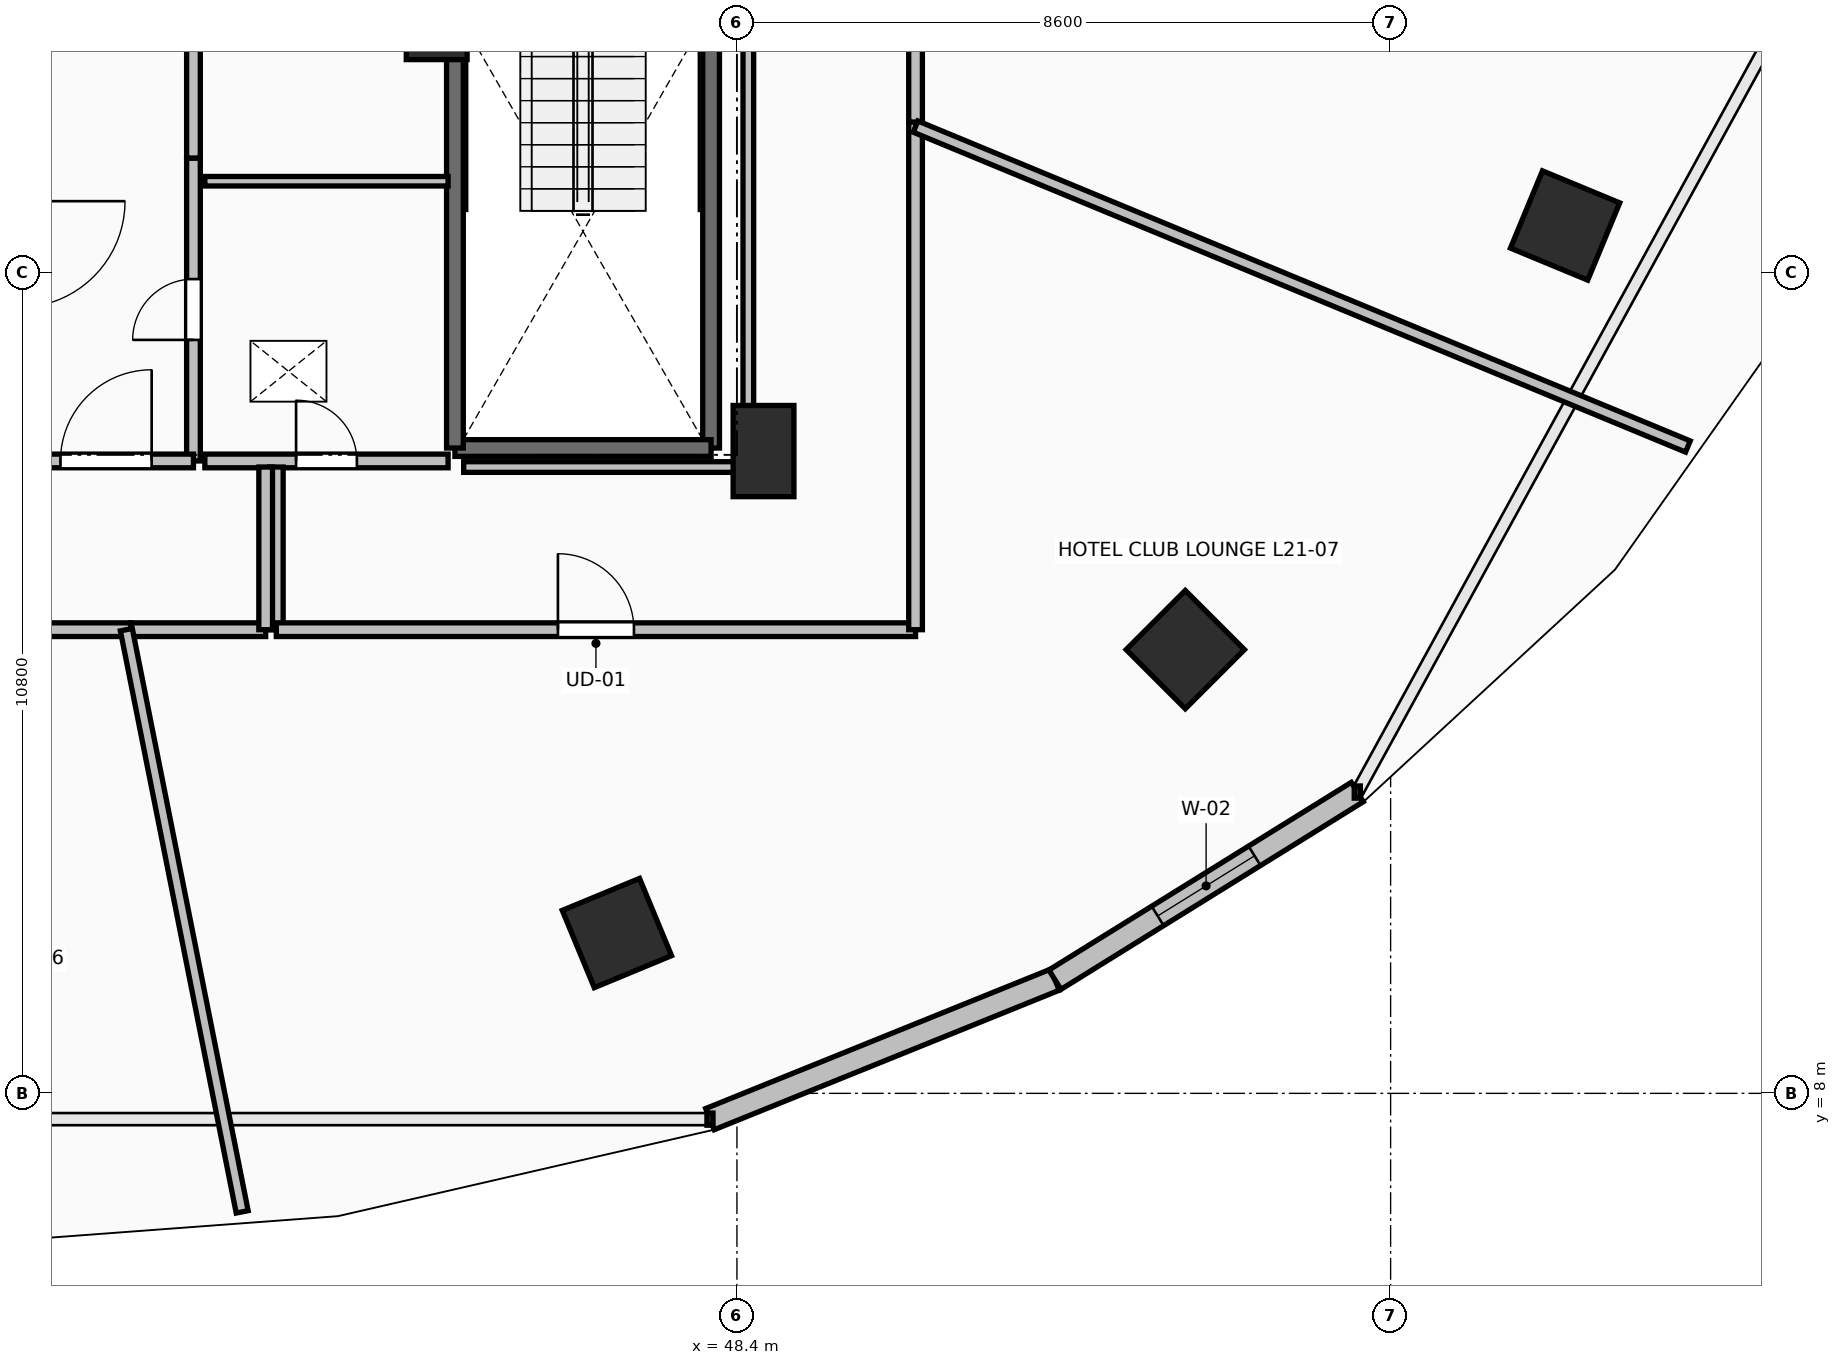
"""IFC4 building model, lengths in metres.
Left out: names, types, materials, properties, quantities, classifications, styles, units other than length and angle.
Written with IfcOpenShell. Run it as: python <this file> out.ifc"""

import sys

from ifc_helpers import new_model, si_unit, direction, frame, frame_2d, origin, origin_2d, place, context, subcontext, project, spatial, rectangle, extrude, element, fill, save


model = new_model("IFC4")
c1 = context("Model", 3, precision=1e-05, world=origin(), true_north=direction((0.0, 1.0)))
c2 = subcontext(c1, "Body", "Model", "MODEL_VIEW")
j1 = project(units=[si_unit("LENGTHUNIT", "METRE"), si_unit("PLANEANGLEUNIT", "RADIAN")], contexts=[c1])
p1 = place(None, origin())
s1 = spatial("IfcSite", under=j1, at=p1, CompositionType="ELEMENT")
p2 = place(p1, origin())
s2 = spatial("IfcBuilding", under=s1, at=p2, CompositionType="ELEMENT")
p3 = place(p2, frame((0.0, 0.0, 82.3)))
s3 = spatial("IfcBuildingStorey", under=s2, at=p3, CompositionType="ELEMENT", Elevation=82.3)
for number, where, z_axis, x_axis in (
    (1, (46.821, 10.109, 0.0), (0.0, 0.0, 1.0), (0.383, -0.924, 0.0)),
    (2, (54.299, 13.838, 0.0), (0.0, 0.0, 1.0), (0.707, -0.707, 0.0)),
    (3, (59.295, 19.418, 0.0), (0.0, 0.0, 1.0), (0.924, -0.383, 0.0)),
):
    element("IfcColumn", number, at=place(p3, frame(where, z_axis=z_axis, x_axis=x_axis)), inside=s3, PredefinedType="COLUMN", context=c2, shape_type="SweptSolid", body=[
        extrude(rectangle(XDim=1.1, YDim=1.1, at=origin_2d()), origin(), (0.0, 0.0, 1.0), 3.5),
    ])
for number, where, z_axis, x_axis in (
    (4, (48.75, 16.45, 0.0), (0.0, 0.0, 1.0), (1.0, 0.0, 0.0)),
    (5, (44.45, 22.2, 0.0), (0.0, 0.0, 1.0), (1.0, 0.0, 0.0)),
):
    element("IfcColumn", number, at=place(p3, frame(where, z_axis=z_axis, x_axis=x_axis)), inside=s3, PredefinedType="PILASTER", context=c2, shape_type="SweptSolid", body=[
        extrude(rectangle(XDim=0.8, YDim=1.2, at=origin_2d()), origin(), (0.0, 0.0, 1.0), 3.5),
    ])
p4 = place(p3, frame((48.045, 7.661, 0.0), z_axis=(0.0, 0.0, 1.0), x_axis=(0.927122233109, 0.374759075775, 0.0)))
e6 = element("IfcWall", 6, at=p4, inside=s3, PredefinedType="STANDARD", context=c2, shape_type="SweptSolid", body=[
    extrude(rectangle(XDim=4.895, YDim=0.3, at=frame_2d((2.448, 0.0))), origin(), (0.0, 0.0, 1.0), 3.24),
])
p5 = place(p3, frame((52.584, 9.495, 0.0), z_axis=(0.0, 0.0, 1.0), x_axis=(0.849684479743, 0.527291461038, 0.0)))
e7 = element("IfcWall", 7, at=p5, inside=s3, PredefinedType="STANDARD", context=c2, shape_type="SweptSolid", body=[
    extrude(rectangle(XDim=4.681, YDim=0.3, at=frame_2d((2.341, 0.0))), origin(), (0.0, 0.0, 1.0), 3.24),
])
p6 = place(p5, frame((1.591, 0.0, 0.85)))
e8 = element("IfcOpeningElement", 8, at=p6, cuts=e7, PredefinedType="OPENING", context=c2, shape_type="SweptSolid", body=[
    extrude(rectangle(XDim=1.5, YDim=2.19, at=frame_2d((0.75, 1.095))), frame((0.0, 0.165, 0.0), z_axis=(0.0, -1.0, 0.0), x_axis=(1.0, 0.0, 0.0)), (0.0, 0.0, 1.0), 0.33),
])
p7 = place(p3, frame((48.06, 23.91, 0.0), z_axis=(0.0, 0.0, 1.0), x_axis=(0.0, -1.0, 0.0)))
e9 = element("IfcWall", 9, at=p7, inside=s3, PredefinedType="SOLIDWALL", context=c2, shape_type="SweptSolid", body=[
    extrude(rectangle(XDim=7.42, YDim=0.22, at=frame_2d((3.71, 0.0))), origin(), (0.0, 0.0, 1.0), 3.24),
])
p8 = place(p3, frame((48.06, 16.49, 0.0), z_axis=(0.0, 0.0, 1.0), x_axis=(-1.0, 0.0, 0.0)))
e10 = element("IfcWall", 10, at=p8, inside=s3, PredefinedType="SOLIDWALL", context=c2, shape_type="SweptSolid", body=[
    extrude(rectangle(XDim=3.37, YDim=0.22, at=frame_2d((1.685, 0.0))), origin(), (0.0, 0.0, 1.0), 3.24),
])
p9 = place(p3, frame((44.69, 16.49, 0.0), z_axis=(0.0, 0.0, 1.0), x_axis=(0.0, 1.0, 0.0)))
e11 = element("IfcWall", 11, at=p9, inside=s3, PredefinedType="SOLIDWALL", context=c2, shape_type="SweptSolid", body=[
    extrude(rectangle(XDim=7.42, YDim=0.22, at=frame_2d((3.71, 0.0))), origin(), (0.0, 0.0, 1.0), 3.24),
])
p10 = place(p3, frame((41.25, 16.32, 0.0), z_axis=(0.0, 0.0, 1.0), x_axis=(0.0, 1.0, 0.0)))
e12 = element("IfcWall", 12, at=p10, inside=s3, PredefinedType="PARTITIONING", context=c2, shape_type="SweptSolid", body=[
    extrude(rectangle(XDim=3.985, YDim=0.18, at=frame_2d((1.992, 0.0))), origin(), (0.0, 0.0, 1.0), 3.24),
])
p11 = place(p10, frame((1.593, 0.0, 0.0)))
e13 = element("IfcOpeningElement", 13, at=p11, cuts=e12, PredefinedType="OPENING", context=c2, shape_type="SweptSolid", body=[
    extrude(rectangle(XDim=0.8, YDim=2.05, at=frame_2d((0.4, 1.025))), frame((0.0, 0.105, 0.0), z_axis=(0.0, -1.0, 0.0), x_axis=(1.0, 0.0, 0.0)), (0.0, 0.0, 1.0), 0.21),
])
p12 = place(p3, frame((41.25, 20.305, 0.0), z_axis=(0.0, 0.0, 1.0), x_axis=(0.0, 1.0, 0.0)))
e14 = element("IfcWall", 14, at=p12, inside=s3, PredefinedType="PARTITIONING", context=c2, shape_type="SweptSolid", body=[
    extrude(rectangle(XDim=3.895, YDim=0.18, at=frame_2d((1.948, 0.0))), origin(), (0.0, 0.0, 1.0), 3.24),
])
p13 = place(p12, frame((1.522, 0.0, 0.0)))
e15 = element("IfcOpeningElement", 15, at=p13, cuts=e14, PredefinedType="OPENING", context=c2, shape_type="SweptSolid", body=[
    extrude(rectangle(XDim=0.85, YDim=2.1, at=frame_2d((0.425, 1.05))), frame((0.0, 0.105, 0.0), z_axis=(0.0, -1.0, 0.0), x_axis=(1.0, 0.0, 0.0)), (0.0, 0.0, 1.0), 0.21),
])
p14 = place(p3, frame((38.95, 16.32, 0.0), z_axis=(0.0, 0.0, 1.0), x_axis=(1.0, 0.0, 0.0)))
e16 = element("IfcWall", 16, at=p14, inside=s3, PredefinedType="PARTITIONING", context=c2, shape_type="SweptSolid", body=[
    extrude(rectangle(XDim=2.3, YDim=0.18, at=frame_2d((1.15, 0.0))), origin(), (0.0, 0.0, 1.0), 3.24),
])
p15 = place(p14, frame((0.55, 0.0, 0.0)))
e17 = element("IfcOpeningElement", 17, at=p15, cuts=e16, PredefinedType="OPENING", context=c2, shape_type="SweptSolid", body=[
    extrude(rectangle(XDim=1.2, YDim=2.15, at=frame_2d((0.6, 1.075))), frame((0.0, 0.105, 0.0), z_axis=(0.0, -1.0, 0.0), x_axis=(1.0, 0.0, 0.0)), (0.0, 0.0, 1.0), 0.21),
])
p16 = place(p3, frame((44.6, 20.0, 0.0), z_axis=(0.0, 0.0, 1.0), x_axis=(-1.0, 0.0, 0.0)))
e18 = element("IfcWall", 18, at=p16, inside=s3, PredefinedType="PARTITIONING", context=c2, shape_type="SweptSolid", body=[
    extrude(rectangle(XDim=3.2, YDim=0.125, at=frame_2d((1.6, 0.0))), origin(), (0.0, 0.0, 1.0), 3.24),
])
p17 = place(p3, frame((41.4, 16.32, 0.0), z_axis=(0.0, 0.0, 1.0), x_axis=(1.0, 0.0, 0.0)))
e19 = element("IfcWall", 19, at=p17, inside=s3, PredefinedType="PARTITIONING", context=c2, shape_type="SweptSolid", body=[
    extrude(rectangle(XDim=3.2, YDim=0.18, at=frame_2d((1.6, 0.0))), origin(), (0.0, 0.0, 1.0), 3.24),
])
p18 = place(p17, frame((1.2, 0.0, 0.0)))
e20 = element("IfcOpeningElement", 20, at=p18, cuts=e19, PredefinedType="OPENING", context=c2, shape_type="SweptSolid", body=[
    extrude(rectangle(XDim=0.8, YDim=2.05, at=frame_2d((0.4, 1.025))), frame((0.0, 0.105, 0.0), z_axis=(0.0, -1.0, 0.0), x_axis=(1.0, 0.0, 0.0)), (0.0, 0.0, 1.0), 0.21),
])
p19 = place(p3, frame((36.341, 14.1, 0.0), z_axis=(0.0, 0.0, 1.0), x_axis=(1.0, 0.0, 0.0)))
e21 = element("IfcWall", 21, at=p19, inside=s3, PredefinedType="PARTITIONING", context=c2, shape_type="SweptSolid", body=[
    extrude(rectangle(XDim=4.087, YDim=0.18, at=frame_2d((2.043, 0.0))), origin(), (0.0, 0.0, 1.0), 2.922),
])
p20 = place(p19, frame((1.519, 0.0, 0.0)))
e22 = element("IfcOpeningElement", 22, at=p20, cuts=e21, PredefinedType="OPENING", context=c2, shape_type="SweptSolid", body=[
    extrude(rectangle(XDim=1.05, YDim=2.2, at=frame_2d((0.525, 1.1))), frame((0.0, 0.105, 0.0), z_axis=(0.0, -1.0, 0.0), x_axis=(1.0, 0.0, 0.0)), (0.0, 0.0, 1.0), 0.21),
])
p21 = place(p3, frame((42.34, 16.24, 0.0), z_axis=(0.0, 0.0, 1.0), x_axis=(0.0, -1.0, 0.0)))
e23 = element("IfcWall", 23, at=p21, inside=s3, PredefinedType="PARTITIONING", context=c2, shape_type="SweptSolid", body=[
    extrude(rectangle(XDim=2.14, YDim=0.18, at=frame_2d((1.07, 0.0))), origin(), (0.0, 0.0, 1.0), 2.922),
])
p22 = place(p3, frame((42.34, 14.1, 0.0), z_axis=(0.0, 0.0, 1.0), x_axis=(1.0, 0.0, 0.0)))
e24 = element("IfcWall", 24, at=p22, inside=s3, PredefinedType="PARTITIONING", context=c2, shape_type="SweptSolid", body=[
    extrude(rectangle(XDim=8.41, YDim=0.18, at=frame_2d((4.205, 0.0))), origin(), (0.0, 0.0, 1.0), 2.432),
])
p23 = place(p22, frame((3.705, 0.0, 0.0)))
e25 = element("IfcOpeningElement", 25, at=p23, cuts=e24, PredefinedType="OPENING", context=c2, shape_type="SweptSolid", body=[
    extrude(rectangle(XDim=1.0, YDim=2.15, at=frame_2d((0.5, 1.075))), frame((0.0, 0.105, 0.0), z_axis=(0.0, -1.0, 0.0), x_axis=(1.0, 0.0, 0.0)), (0.0, 0.0, 1.0), 0.21),
])
p24 = place(p3, frame((50.75, 14.1, 0.0), z_axis=(0.0, 0.0, 1.0), x_axis=(0.0, 1.0, 0.0)))
e26 = element("IfcWall", 26, at=p24, inside=s3, PredefinedType="PARTITIONING", context=c2, shape_type="SweptSolid", body=[
    extrude(rectangle(XDim=6.679, YDim=0.18, at=frame_2d((3.339, 0.0))), origin(), (0.0, 0.0, 1.0), 2.432),
])
p25 = place(p3, frame((40.428, 14.1, 0.0), z_axis=(0.0, 0.0, 1.0), x_axis=(1.0, 0.0, 0.0)))
e27 = element("IfcWall", 27, at=p25, inside=s3, PredefinedType="PARTITIONING", context=c2, shape_type="SweptSolid", body=[
    extrude(rectangle(XDim=1.772, YDim=0.18, at=frame_2d((0.886, 0.0))), origin(), (0.0, 0.0, 1.0), 2.922),
])
p26 = place(p3, frame((42.2, 14.1, 0.0), z_axis=(0.0, 0.0, 1.0), x_axis=(0.0, 1.0, 0.0)))
e28 = element("IfcWall", 28, at=p26, inside=s3, PredefinedType="PARTITIONING", context=c2, shape_type="SweptSolid", body=[
    extrude(rectangle(XDim=2.14, YDim=0.18, at=frame_2d((1.07, 0.0))), origin(), (0.0, 0.0, 1.0), 2.922),
])
p27 = place(p3, frame((50.75, 20.779, 0.0), z_axis=(0.0, 0.0, 1.0), x_axis=(0.0, 1.0, 0.0)))
e29 = element("IfcWall", 29, at=p27, inside=s3, PredefinedType="PARTITIONING", context=c2, shape_type="SweptSolid", body=[
    extrude(rectangle(XDim=13.54, YDim=0.18, at=frame_2d((6.77, 0.0))), origin(), (0.0, 0.0, 1.0), 2.432),
])
p28 = place(p27, frame((6.27, 0.0, 0.0)))
e30 = element("IfcOpeningElement", 30, at=p28, cuts=e29, PredefinedType="OPENING", context=c2, shape_type="SweptSolid", body=[
    extrude(rectangle(XDim=1.0, YDim=2.15, at=frame_2d((0.5, 1.075))), frame((0.0, 0.105, 0.0), z_axis=(0.0, -1.0, 0.0), x_axis=(1.0, 0.0, 0.0)), (0.0, 0.0, 1.0), 0.21),
])
p29 = place(p3, frame((41.891, 6.441, 0.0), z_axis=(0.0, 0.0, 1.0), x_axis=(-0.195172155482, 0.980768999166, 0.0)))
e31 = element("IfcWall", 31, at=p29, inside=s3, PredefinedType="PARTITIONING", context=c2, shape_type="SweptSolid", body=[
    extrude(rectangle(XDim=7.809, YDim=0.16, at=frame_2d((3.905, 0.0))), origin(), (0.0, 0.0, 1.0), 2.432),
])
p30 = place(p3, frame((60.911, 16.51, 0.0), z_axis=(0.0, 0.0, 1.0), x_axis=(-0.923872894692, 0.382699457086, 0.0)))
e32 = element("IfcWall", 32, at=p30, inside=s3, PredefinedType="PARTITIONING", context=c2, shape_type="SweptSolid", body=[
    extrude(rectangle(XDim=10.998, YDim=0.16, at=frame_2d((5.499, 0.0))), origin(), (0.0, 0.0, 1.0), 2.677),
])
p31 = place(p3, frame((48.55, 23.754, 0.0), z_axis=(0.0, 0.0, 1.0), x_axis=(0.0, -1.0, 0.0)))
e33 = element("IfcWall", 33, at=p31, inside=s3, PredefinedType="PARTITIONING", context=c2, shape_type="SweptSolid", body=[
    extrude(rectangle(XDim=7.514, YDim=0.14, at=frame_2d((3.757, 0.0))), origin(), (0.0, 0.0, 1.0), 2.432),
])
p32 = place(p3, frame((48.55, 16.24, 0.0), z_axis=(0.0, 0.0, 1.0), x_axis=(-1.0, 0.0, 0.0)))
e34 = element("IfcWall", 34, at=p32, inside=s3, PredefinedType="PARTITIONING", context=c2, shape_type="SweptSolid", body=[
    extrude(rectangle(XDim=3.745, YDim=0.14, at=frame_2d((1.873, 0.0))), origin(), (0.0, 0.0, 1.0), 2.432),
])
p33 = place(p6, origin())
e35 = element("IfcWindow", 35, at=p33, inside=s3, PartitioningType="SINGLE_PANEL", PredefinedType="WINDOW", context=c2, shape_type="SweptSolid", body=[
    extrude(rectangle(XDim=1.5, YDim=2.19, at=frame_2d((0.75, 1.095))), frame((0.0, 0.03, 0.0), z_axis=(0.0, -1.0, 0.0), x_axis=(1.0, 0.0, 0.0)), (0.0, 0.0, 1.0), 0.06),
])
fill(e8, e35)
p34 = place(p11, origin())
e36 = element("IfcDoor", 36, at=p34, inside=s3, OperationType="SINGLE_SWING_LEFT", PredefinedType="DOOR", context=c2, shape_type="SweptSolid", body=[
    extrude(rectangle(XDim=0.8, YDim=2.05, at=frame_2d((0.4, 1.025))), frame((0.0, 0.025, 0.0), z_axis=(0.0, -1.0, 0.0), x_axis=(1.0, 0.0, 0.0)), (0.0, 0.0, 1.0), 0.05),
])
fill(e13, e36)
p35 = place(p15, origin())
e37 = element("IfcDoor", 37, at=p35, inside=s3, OperationType="SINGLE_SWING_RIGHT", PredefinedType="DOOR", context=c2, shape_type="SweptSolid", body=[
    extrude(rectangle(XDim=1.2, YDim=2.15, at=frame_2d((0.6, 1.075))), frame((0.0, 0.025, 0.0), z_axis=(0.0, -1.0, 0.0), x_axis=(1.0, 0.0, 0.0)), (0.0, 0.0, 1.0), 0.05),
])
fill(e17, e37)
p36 = place(p18, origin())
e38 = element("IfcDoor", 38, at=p36, inside=s3, OperationType="SINGLE_SWING_LEFT", PredefinedType="DOOR", context=c2, shape_type="SweptSolid", body=[
    extrude(rectangle(XDim=0.8, YDim=2.05, at=frame_2d((0.4, 1.025))), frame((0.0, 0.025, 0.0), z_axis=(0.0, -1.0, 0.0), x_axis=(1.0, 0.0, 0.0)), (0.0, 0.0, 1.0), 0.05),
])
fill(e20, e38)
p37 = place(p23, origin())
e39 = element("IfcDoor", 39, at=p37, inside=s3, OperationType="SINGLE_SWING_LEFT", PredefinedType="DOOR", context=c2, shape_type="SweptSolid", body=[
    extrude(rectangle(XDim=1.0, YDim=2.15, at=frame_2d((0.5, 1.075))), frame((0.0, 0.025, 0.0), z_axis=(0.0, -1.0, 0.0), x_axis=(1.0, 0.0, 0.0)), (0.0, 0.0, 1.0), 0.05),
])
fill(e25, e39)
save(model, sys.argv[1])
